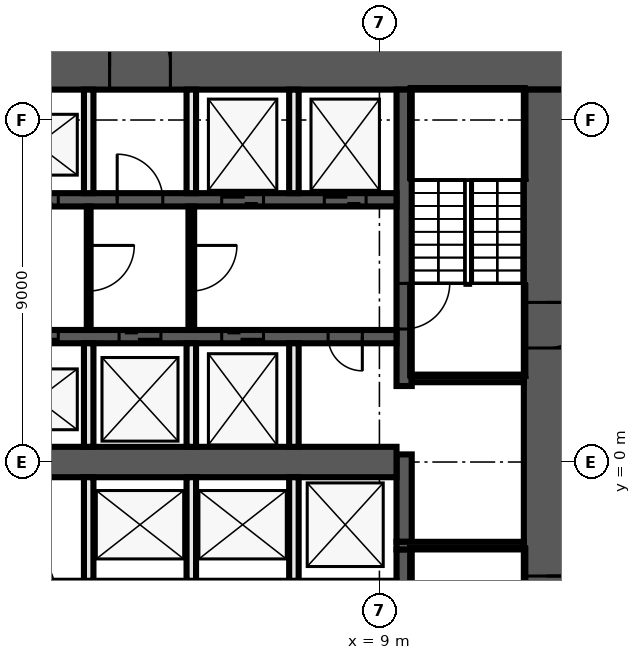
"""IFC4 building model, lengths in metres.
Left out: names, types, materials, properties, quantities, classifications, styles, units other than length and angle.
Written with IfcOpenShell. Run it as: python <this file> out.ifc"""

import sys

from ifc_helpers import new_model, si_unit, direction, frame, frame_2d, origin, place, context, subcontext, project, spatial, rectangle, extrude, element, fill, save


model = new_model("IFC4")
c1 = context("Model", 3, precision=1e-05, world=origin(), true_north=direction((0.0, 1.0)))
c2 = subcontext(c1, "Body", "Model", "MODEL_VIEW")
j1 = project(units=[si_unit("LENGTHUNIT", "METRE"), si_unit("PLANEANGLEUNIT", "RADIAN")], contexts=[c1])
p1 = place(None, origin())
s1 = spatial("IfcSite", under=j1, at=p1, CompositionType="ELEMENT")
p2 = place(p1, origin())
s2 = spatial("IfcBuilding", under=s1, at=p2, CompositionType="ELEMENT")
p3 = place(p2, origin())
s3 = spatial("IfcBuildingStorey", under=s2, at=p3, CompositionType="ELEMENT", Elevation=0.0)
p4 = place(p3, frame((-14.0, 10.4, 0.0), z_axis=(0.0, 0.0, 1.0), x_axis=(1.0, 0.0, 0.0)))
e1 = element("IfcWall", 1, at=p4, inside=s3, PredefinedType="SHEAR", context=c2, shape_type="SweptSolid", body=[
    extrude(rectangle(XDim=28.0, YDim=1.2, at=frame_2d((14.0, 0.0))), origin(), (0.0, 0.0, 1.0), 8.55),
])
p5 = place(p4, frame((15.9, 0.0, 0.0)))
e2 = element("IfcOpeningElement", 2, at=p5, cuts=e1, PredefinedType="OPENING", context=c2, shape_type="SweptSolid", body=[
    extrude(rectangle(XDim=1.6, YDim=2.1, at=frame_2d((0.8, 1.05))), frame((0.0, 0.61, 0.0), z_axis=(0.0, -1.0, 0.0), x_axis=(1.0, 0.0, 0.0)), (0.0, 0.0, 1.0), 1.22),
])
p6 = place(p3, frame((13.4, 9.8, 0.0), z_axis=(0.0, 0.0, 1.0), x_axis=(0.0, -1.0, 0.0)))
e3 = element("IfcWall", 3, at=p6, inside=s3, PredefinedType="SHEAR", context=c2, shape_type="SweptSolid", body=[
    extrude(rectangle(XDim=19.6, YDim=1.2, at=frame_2d((9.8, 0.0))), origin(), (0.0, 0.0, 1.0), 8.55),
])
p7 = place(p6, frame((5.6, 0.0, 0.0)))
e4 = element("IfcOpeningElement", 4, at=p7, cuts=e3, PredefinedType="OPENING", context=c2, shape_type="SweptSolid", body=[
    extrude(rectangle(XDim=1.2, YDim=2.1, at=frame_2d((0.6, 1.05))), frame((0.0, 0.61, 0.0), z_axis=(0.0, -1.0, 0.0), x_axis=(1.0, 0.0, 0.0)), (0.0, 0.0, 1.0), 1.22),
])
p8 = place(p6, frame((12.8, 0.0, 0.0)))
e5 = element("IfcOpeningElement", 5, at=p8, cuts=e3, PredefinedType="OPENING", context=c2, shape_type="SweptSolid", body=[
    extrude(rectangle(XDim=1.2, YDim=2.1, at=frame_2d((0.6, 1.05))), frame((0.0, 0.61, 0.0), z_axis=(0.0, -1.0, 0.0), x_axis=(1.0, 0.0, 0.0)), (0.0, 0.0, 1.0), 1.22),
])
p9 = place(p3, frame((9.65, -2.3, 0.0), z_axis=(0.0, 0.0, 1.0), x_axis=(0.0, -1.0, 0.0)))
e6 = element("IfcWall", 6, at=p9, inside=s3, PredefinedType="SHEAR", context=c2, shape_type="SweptSolid", body=[
    extrude(rectangle(XDim=7.5, YDim=0.4, at=frame_2d((3.75, 0.0))), origin(), (0.0, 0.0, 1.0), 8.55),
])
p10 = place(p9, frame((1.2, 0.0, 0.0)))
e7 = element("IfcOpeningElement", 7, at=p10, cuts=e6, PredefinedType="OPENING", context=c2, shape_type="SweptSolid", body=[
    extrude(rectangle(XDim=1.2, YDim=2.1, at=frame_2d((0.6, 1.05))), frame((0.0, 0.21, 0.0), z_axis=(0.0, -1.0, 0.0), x_axis=(1.0, 0.0, 0.0)), (0.0, 0.0, 1.0), 0.42),
])
p11 = place(p3, frame((9.65, -2.1, 0.0), z_axis=(0.0, 0.0, 1.0), x_axis=(0.0, 1.0, 0.0)))
e8 = element("IfcWall", 8, at=p11, inside=s3, PredefinedType="SHEAR", context=c2, shape_type="SweptSolid", body=[
    extrude(rectangle(XDim=2.3, YDim=0.4, at=frame_2d((1.15, 0.0))), origin(), (0.0, 0.0, 1.0), 8.55),
])
p12 = place(p3, frame((9.65, 9.8, 0.0), z_axis=(0.0, 0.0, 1.0), x_axis=(0.0, -1.0, 0.0)))
e9 = element("IfcWall", 9, at=p12, inside=s3, PredefinedType="SHEAR", context=c2, shape_type="SweptSolid", body=[
    extrude(rectangle(XDim=7.8, YDim=0.4, at=frame_2d((3.9, 0.0))), origin(), (0.0, 0.0, 1.0), 8.55),
])
p13 = place(p12, frame((5.1, 0.0, 0.0)))
e10 = element("IfcOpeningElement", 10, at=p13, cuts=e9, PredefinedType="OPENING", context=c2, shape_type="SweptSolid", body=[
    extrude(rectangle(XDim=1.2, YDim=2.1, at=frame_2d((0.6, 1.05))), frame((0.0, 0.21, 0.0), z_axis=(0.0, -1.0, 0.0), x_axis=(1.0, 0.0, 0.0)), (0.0, 0.0, 1.0), 0.42),
])
p14 = place(p3, frame((9.85, 2.2, 0.0), z_axis=(0.0, 0.0, 1.0), x_axis=(1.0, 0.0, 0.0)))
e11 = element("IfcWall", 11, at=p14, inside=s3, PredefinedType="SHEAR", context=c2, shape_type="SweptSolid", body=[
    extrude(rectangle(XDim=2.95, YDim=0.2, at=frame_2d((1.475, 0.0))), origin(), (0.0, 0.0, 1.0), 8.55),
])
p15 = place(p3, frame((9.45, -2.2, 0.0), z_axis=(0.0, 0.0, 1.0), x_axis=(1.0, 0.0, 0.0)))
e12 = element("IfcWall", 12, at=p15, inside=s3, PredefinedType="SHEAR", context=c2, shape_type="SweptSolid", body=[
    extrude(rectangle(XDim=3.35, YDim=0.2, at=frame_2d((1.675, 0.0))), origin(), (0.0, 0.0, 1.0), 8.55),
])
p16 = place(p3, frame((-9.45, 6.9, 0.0), z_axis=(0.0, 0.0, 1.0), x_axis=(1.0, 0.0, 0.0)))
e13 = element("IfcWall", 13, at=p16, inside=s3, PredefinedType="SHEAR", context=c2, shape_type="SweptSolid", body=[
    extrude(rectangle(XDim=18.9, YDim=0.35, at=frame_2d((9.45, 0.0))), origin(), (0.0, 0.0, 1.0), 8.55),
])
p17 = place(p16, frame((0.8, 0.0, 0.0)))
e14 = element("IfcOpeningElement", 14, at=p17, cuts=e13, PredefinedType="OPENING", context=c2, shape_type="SweptSolid", body=[
    extrude(rectangle(XDim=1.1, YDim=2.1, at=frame_2d((0.55, 1.05))), frame((0.0, 0.185, 0.0), z_axis=(0.0, -1.0, 0.0), x_axis=(1.0, 0.0, 0.0)), (0.0, 0.0, 1.0), 0.37),
])
p18 = place(p16, frame((3.5, 0.0, 0.0)))
e15 = element("IfcOpeningElement", 15, at=p18, cuts=e13, PredefinedType="OPENING", context=c2, shape_type="SweptSolid", body=[
    extrude(rectangle(XDim=1.1, YDim=2.1, at=frame_2d((0.55, 1.05))), frame((0.0, 0.185, 0.0), z_axis=(0.0, -1.0, 0.0), x_axis=(1.0, 0.0, 0.0)), (0.0, 0.0, 1.0), 0.37),
])
p19 = place(p16, frame((6.2, 0.0, 0.0)))
e16 = element("IfcOpeningElement", 16, at=p19, cuts=e13, PredefinedType="OPENING", context=c2, shape_type="SweptSolid", body=[
    extrude(rectangle(XDim=1.1, YDim=2.1, at=frame_2d((0.55, 1.05))), frame((0.0, 0.185, 0.0), z_axis=(0.0, -1.0, 0.0), x_axis=(1.0, 0.0, 0.0)), (0.0, 0.0, 1.0), 0.37),
])
p20 = place(p16, frame((8.9, 0.0, 0.0)))
e17 = element("IfcOpeningElement", 17, at=p20, cuts=e13, PredefinedType="OPENING", context=c2, shape_type="SweptSolid", body=[
    extrude(rectangle(XDim=1.1, YDim=2.1, at=frame_2d((0.55, 1.05))), frame((0.0, 0.185, 0.0), z_axis=(0.0, -1.0, 0.0), x_axis=(1.0, 0.0, 0.0)), (0.0, 0.0, 1.0), 0.37),
])
p21 = place(p16, frame((11.55, 0.0, 0.0)))
e18 = element("IfcOpeningElement", 18, at=p21, cuts=e13, PredefinedType="OPENING", context=c2, shape_type="SweptSolid", body=[
    extrude(rectangle(XDim=1.2, YDim=2.1, at=frame_2d((0.6, 1.05))), frame((0.0, 0.185, 0.0), z_axis=(0.0, -1.0, 0.0), x_axis=(1.0, 0.0, 0.0)), (0.0, 0.0, 1.0), 0.37),
])
p22 = place(p16, frame((14.3, 0.0, 0.0)))
e19 = element("IfcOpeningElement", 19, at=p22, cuts=e13, PredefinedType="OPENING", context=c2, shape_type="SweptSolid", body=[
    extrude(rectangle(XDim=1.1, YDim=2.1, at=frame_2d((0.55, 1.05))), frame((0.0, 0.185, 0.0), z_axis=(0.0, -1.0, 0.0), x_axis=(1.0, 0.0, 0.0)), (0.0, 0.0, 1.0), 0.37),
])
p23 = place(p16, frame((17.0, 0.0, 0.0)))
e20 = element("IfcOpeningElement", 20, at=p23, cuts=e13, PredefinedType="OPENING", context=c2, shape_type="SweptSolid", body=[
    extrude(rectangle(XDim=1.1, YDim=2.1, at=frame_2d((0.55, 1.05))), frame((0.0, 0.185, 0.0), z_axis=(0.0, -1.0, 0.0), x_axis=(1.0, 0.0, 0.0)), (0.0, 0.0, 1.0), 0.37),
])
p24 = place(p3, frame((9.45, 3.3, 0.0), z_axis=(0.0, 0.0, 1.0), x_axis=(-1.0, 0.0, 0.0)))
e21 = element("IfcWall", 21, at=p24, inside=s3, PredefinedType="SHEAR", context=c2, shape_type="SweptSolid", body=[
    extrude(rectangle(XDim=18.9, YDim=0.35, at=frame_2d((9.45, 0.0))), origin(), (0.0, 0.0, 1.0), 8.55),
])
p25 = place(p24, frame((0.9, 0.0, 0.0)))
e22 = element("IfcOpeningElement", 22, at=p25, cuts=e21, PredefinedType="OPENING", context=c2, shape_type="SweptSolid", body=[
    extrude(rectangle(XDim=0.9, YDim=2.1, at=frame_2d((0.45, 1.05))), frame((0.0, 0.185, 0.0), z_axis=(0.0, -1.0, 0.0), x_axis=(1.0, 0.0, 0.0)), (0.0, 0.0, 1.0), 0.37),
])
p26 = place(p24, frame((17.0, 0.0, 0.0)))
e23 = element("IfcOpeningElement", 23, at=p26, cuts=e21, PredefinedType="OPENING", context=c2, shape_type="SweptSolid", body=[
    extrude(rectangle(XDim=1.1, YDim=2.1, at=frame_2d((0.55, 1.05))), frame((0.0, 0.185, 0.0), z_axis=(0.0, -1.0, 0.0), x_axis=(1.0, 0.0, 0.0)), (0.0, 0.0, 1.0), 0.37),
])
p27 = place(p24, frame((14.3, 0.0, 0.0)))
e24 = element("IfcOpeningElement", 24, at=p27, cuts=e21, PredefinedType="OPENING", context=c2, shape_type="SweptSolid", body=[
    extrude(rectangle(XDim=1.1, YDim=2.1, at=frame_2d((0.55, 1.05))), frame((0.0, 0.185, 0.0), z_axis=(0.0, -1.0, 0.0), x_axis=(1.0, 0.0, 0.0)), (0.0, 0.0, 1.0), 0.37),
])
p28 = place(p24, frame((11.6, 0.0, 0.0)))
e25 = element("IfcOpeningElement", 25, at=p28, cuts=e21, PredefinedType="OPENING", context=c2, shape_type="SweptSolid", body=[
    extrude(rectangle(XDim=1.1, YDim=2.1, at=frame_2d((0.55, 1.05))), frame((0.0, 0.185, 0.0), z_axis=(0.0, -1.0, 0.0), x_axis=(1.0, 0.0, 0.0)), (0.0, 0.0, 1.0), 0.37),
])
p29 = place(p24, frame((8.9, 0.0, 0.0)))
e26 = element("IfcOpeningElement", 26, at=p29, cuts=e21, PredefinedType="OPENING", context=c2, shape_type="SweptSolid", body=[
    extrude(rectangle(XDim=1.1, YDim=2.1, at=frame_2d((0.55, 1.05))), frame((0.0, 0.185, 0.0), z_axis=(0.0, -1.0, 0.0), x_axis=(1.0, 0.0, 0.0)), (0.0, 0.0, 1.0), 0.37),
])
p30 = place(p24, frame((6.2, 0.0, 0.0)))
e27 = element("IfcOpeningElement", 27, at=p30, cuts=e21, PredefinedType="OPENING", context=c2, shape_type="SweptSolid", body=[
    extrude(rectangle(XDim=1.1, YDim=2.1, at=frame_2d((0.55, 1.05))), frame((0.0, 0.185, 0.0), z_axis=(0.0, -1.0, 0.0), x_axis=(1.0, 0.0, 0.0)), (0.0, 0.0, 1.0), 0.37),
])
p31 = place(p24, frame((3.5, 0.0, 0.0)))
e28 = element("IfcOpeningElement", 28, at=p31, cuts=e21, PredefinedType="OPENING", context=c2, shape_type="SweptSolid", body=[
    extrude(rectangle(XDim=1.1, YDim=2.1, at=frame_2d((0.55, 1.05))), frame((0.0, 0.185, 0.0), z_axis=(0.0, -1.0, 0.0), x_axis=(1.0, 0.0, 0.0)), (0.0, 0.0, 1.0), 0.37),
])
p32 = place(p3, frame((-9.45, 0.0, 0.0), z_axis=(0.0, 0.0, 1.0), x_axis=(1.0, 0.0, 0.0)))
e29 = element("IfcWall", 29, at=p32, inside=s3, PredefinedType="SHEAR", context=c2, shape_type="SweptSolid", body=[
    extrude(rectangle(XDim=18.9, YDim=0.8, at=frame_2d((9.45, 0.0))), origin(), (0.0, 0.0, 1.0), 8.55),
])
for number, where, z_axis, x_axis in (
    (30, (6.75, -3.125, 0.0), (0.0, 0.0, 1.0), (0.0, 1.0, 0.0)),
    (31, (6.75, 0.4, 0.0), (0.0, 0.0, 1.0), (0.0, 1.0, 0.0)),
    (32, (6.75, 7.075, 0.0), (0.0, 0.0, 1.0), (0.0, 1.0, 0.0)),
):
    element("IfcWall", number, at=place(p3, frame(where, z_axis=z_axis, x_axis=x_axis)), inside=s3, PredefinedType="SOLIDWALL", context=c2, shape_type="SweptSolid", body=[
        extrude(rectangle(XDim=2.725, YDim=0.25, at=frame_2d((1.363, 0.0))), origin(), (0.0, 0.0, 1.0), 8.55),
    ])
p33 = place(p3, frame((4.05, 6.725, 0.0), z_axis=(0.0, 0.0, 1.0), x_axis=(0.0, -1.0, 0.0)))
e33 = element("IfcWall", 33, at=p33, inside=s3, PredefinedType="PARTITIONING", context=c2, shape_type="SweptSolid", body=[
    extrude(rectangle(XDim=3.25, YDim=0.15, at=frame_2d((1.625, 0.0))), origin(), (0.0, 0.0, 1.0), 8.55),
])
p34 = place(p33, frame((1.025, 0.0, 0.0)))
e34 = element("IfcOpeningElement", 34, at=p34, cuts=e33, PredefinedType="OPENING", context=c2, shape_type="SweptSolid", body=[
    extrude(rectangle(XDim=1.2, YDim=2.1, at=frame_2d((0.6, 1.05))), frame((0.0, 0.085, 0.0), z_axis=(0.0, -1.0, 0.0), x_axis=(1.0, 0.0, 0.0)), (0.0, 0.0, 1.0), 0.17),
])
for number, where, z_axis, x_axis in (
    (35, (4.05, -3.125, 0.0), (0.0, 0.0, 1.0), (0.0, 1.0, 0.0)),
    (36, (4.05, 0.4, 0.0), (0.0, 0.0, 1.0), (0.0, 1.0, 0.0)),
    (37, (4.05, 7.075, 0.0), (0.0, 0.0, 1.0), (0.0, 1.0, 0.0)),
):
    element("IfcWall", number, at=place(p3, frame(where, z_axis=z_axis, x_axis=x_axis)), inside=s3, PredefinedType="SOLIDWALL", context=c2, shape_type="SweptSolid", body=[
        extrude(rectangle(XDim=2.725, YDim=0.25, at=frame_2d((1.363, 0.0))), origin(), (0.0, 0.0, 1.0), 8.55),
    ])
p35 = place(p3, frame((1.35, 6.725, 0.0), z_axis=(0.0, 0.0, 1.0), x_axis=(0.0, -1.0, 0.0)))
e38 = element("IfcWall", 38, at=p35, inside=s3, PredefinedType="PARTITIONING", context=c2, shape_type="SweptSolid", body=[
    extrude(rectangle(XDim=3.25, YDim=0.1, at=frame_2d((1.625, 0.0))), origin(), (0.0, 0.0, 1.0), 8.55),
])
p36 = place(p35, frame((1.025, 0.0, 0.0)))
e39 = element("IfcOpeningElement", 39, at=p36, cuts=e38, PredefinedType="OPENING", context=c2, shape_type="SweptSolid", body=[
    extrude(rectangle(XDim=1.2, YDim=2.1, at=frame_2d((0.6, 1.05))), frame((0.0, 0.06, 0.0), z_axis=(0.0, -1.0, 0.0), x_axis=(1.0, 0.0, 0.0)), (0.0, 0.0, 1.0), 0.12),
])
for number, where, z_axis, x_axis in (
    (40, (1.35, -3.125, 0.0), (0.0, 0.0, 1.0), (0.0, 1.0, 0.0)),
    (41, (1.35, 0.4, 0.0), (0.0, 0.0, 1.0), (0.0, 1.0, 0.0)),
    (42, (1.35, 7.075, 0.0), (0.0, 0.0, 1.0), (0.0, 1.0, 0.0)),
):
    element("IfcWall", number, at=place(p3, frame(where, z_axis=z_axis, x_axis=x_axis)), inside=s3, PredefinedType="SOLIDWALL", context=c2, shape_type="SweptSolid", body=[
        extrude(rectangle(XDim=2.725, YDim=0.25, at=frame_2d((1.363, 0.0))), origin(), (0.0, 0.0, 1.0), 8.55),
    ])
p37 = place(p25, origin())
e43 = element("IfcDoor", 43, at=p37, inside=s3, OperationType="SINGLE_SWING_LEFT", PredefinedType="DOOR", context=c2, shape_type="SweptSolid", body=[
    extrude(rectangle(XDim=0.9, YDim=2.1, at=frame_2d((0.45, 1.05))), frame((0.0, 0.025, 0.0), z_axis=(0.0, -1.0, 0.0), x_axis=(1.0, 0.0, 0.0)), (0.0, 0.0, 1.0), 0.05),
])
fill(e22, e43)
p38 = place(p20, origin())
e44 = element("IfcDoor", 44, at=p38, inside=s3, OperationType="DOUBLE_DOOR_SLIDING", PredefinedType="DOOR", context=c2, shape_type="SweptSolid", body=[
    extrude(rectangle(XDim=1.1, YDim=2.1, at=frame_2d((0.55, 1.05))), frame((0.0, 0.025, 0.0), z_axis=(0.0, -1.0, 0.0), x_axis=(1.0, 0.0, 0.0)), (0.0, 0.0, 1.0), 0.05),
])
fill(e17, e44)
p39 = place(p5, origin())
e45 = element("IfcDoor", 45, at=p39, inside=s3, OperationType="DOUBLE_DOOR_SINGLE_SWING", PredefinedType="DOOR", context=c2, shape_type="SweptSolid", body=[
    extrude(rectangle(XDim=1.6, YDim=2.1, at=frame_2d((0.8, 1.05))), frame((0.0, 0.025, 0.0), z_axis=(0.0, -1.0, 0.0), x_axis=(1.0, 0.0, 0.0)), (0.0, 0.0, 1.0), 0.05),
])
fill(e2, e45)
p40 = place(p21, origin())
e46 = element("IfcDoor", 46, at=p40, inside=s3, OperationType="SINGLE_SWING_LEFT", PredefinedType="DOOR", context=c2, shape_type="SweptSolid", body=[
    extrude(rectangle(XDim=1.2, YDim=2.1, at=frame_2d((0.6, 1.05))), frame((0.0, 0.025, 0.0), z_axis=(0.0, -1.0, 0.0), x_axis=(1.0, 0.0, 0.0)), (0.0, 0.0, 1.0), 0.05),
])
fill(e18, e46)
p41 = place(p22, origin())
e47 = element("IfcDoor", 47, at=p41, inside=s3, OperationType="DOUBLE_DOOR_SLIDING", PredefinedType="DOOR", context=c2, shape_type="SweptSolid", body=[
    extrude(rectangle(XDim=1.1, YDim=2.1, at=frame_2d((0.55, 1.05))), frame((0.0, 0.025, 0.0), z_axis=(0.0, -1.0, 0.0), x_axis=(1.0, 0.0, 0.0)), (0.0, 0.0, 1.0), 0.05),
])
fill(e19, e47)
p42 = place(p23, origin())
e48 = element("IfcDoor", 48, at=p42, inside=s3, OperationType="DOUBLE_DOOR_SLIDING", PredefinedType="DOOR", context=c2, shape_type="SweptSolid", body=[
    extrude(rectangle(XDim=1.1, YDim=2.1, at=frame_2d((0.55, 1.05))), frame((0.0, 0.025, 0.0), z_axis=(0.0, -1.0, 0.0), x_axis=(1.0, 0.0, 0.0)), (0.0, 0.0, 1.0), 0.05),
])
fill(e20, e48)
p43 = place(p29, origin())
e49 = element("IfcDoor", 49, at=p43, inside=s3, OperationType="DOUBLE_DOOR_SLIDING", PredefinedType="DOOR", context=c2, shape_type="SweptSolid", body=[
    extrude(rectangle(XDim=1.1, YDim=2.1, at=frame_2d((0.55, 1.05))), frame((0.0, 0.025, 0.0), z_axis=(0.0, -1.0, 0.0), x_axis=(1.0, 0.0, 0.0)), (0.0, 0.0, 1.0), 0.05),
])
fill(e26, e49)
p44 = place(p30, origin())
e50 = element("IfcDoor", 50, at=p44, inside=s3, OperationType="DOUBLE_DOOR_SLIDING", PredefinedType="DOOR", context=c2, shape_type="SweptSolid", body=[
    extrude(rectangle(XDim=1.1, YDim=2.1, at=frame_2d((0.55, 1.05))), frame((0.0, 0.025, 0.0), z_axis=(0.0, -1.0, 0.0), x_axis=(1.0, 0.0, 0.0)), (0.0, 0.0, 1.0), 0.05),
])
fill(e27, e50)
p45 = place(p31, origin())
e51 = element("IfcDoor", 51, at=p45, inside=s3, OperationType="DOUBLE_DOOR_SLIDING", PredefinedType="DOOR", context=c2, shape_type="SweptSolid", body=[
    extrude(rectangle(XDim=1.1, YDim=2.1, at=frame_2d((0.55, 1.05))), frame((0.0, 0.025, 0.0), z_axis=(0.0, -1.0, 0.0), x_axis=(1.0, 0.0, 0.0)), (0.0, 0.0, 1.0), 0.05),
])
fill(e28, e51)
p46 = place(p13, origin())
e52 = element("IfcDoor", 52, at=p46, inside=s3, OperationType="SINGLE_SWING_LEFT", PredefinedType="DOOR", context=c2, shape_type="SweptSolid", body=[
    extrude(rectangle(XDim=1.2, YDim=2.1, at=frame_2d((0.6, 1.05))), frame((0.0, 0.025, 0.0), z_axis=(0.0, -1.0, 0.0), x_axis=(1.0, 0.0, 0.0)), (0.0, 0.0, 1.0), 0.05),
])
fill(e10, e52)
p47 = place(p36, origin())
e53 = element("IfcDoor", 53, at=p47, inside=s3, OperationType="SINGLE_SWING_LEFT", PredefinedType="DOOR", context=c2, shape_type="SweptSolid", body=[
    extrude(rectangle(XDim=1.2, YDim=2.1, at=frame_2d((0.6, 1.05))), frame((0.0, 0.025, 0.0), z_axis=(0.0, -1.0, 0.0), x_axis=(1.0, 0.0, 0.0)), (0.0, 0.0, 1.0), 0.05),
])
fill(e39, e53)
p48 = place(p34, origin())
e54 = element("IfcDoor", 54, at=p48, inside=s3, OperationType="SINGLE_SWING_RIGHT", PredefinedType="DOOR", context=c2, shape_type="SweptSolid", body=[
    extrude(rectangle(XDim=1.2, YDim=2.1, at=frame_2d((0.6, 1.05))), frame((0.0, 0.025, 0.0), z_axis=(0.0, -1.0, 0.0), x_axis=(1.0, 0.0, 0.0)), (0.0, 0.0, 1.0), 0.05),
])
fill(e34, e54)
p49 = place(p7, origin())
e55 = element("IfcDoor", 55, at=p49, inside=s3, OperationType="SINGLE_SWING_LEFT", PredefinedType="DOOR", context=c2, shape_type="SweptSolid", body=[
    extrude(rectangle(XDim=1.2, YDim=2.1, at=frame_2d((0.6, 1.05))), frame((0.0, 0.025, 0.0), z_axis=(0.0, -1.0, 0.0), x_axis=(1.0, 0.0, 0.0)), (0.0, 0.0, 1.0), 0.05),
])
fill(e4, e55)
p50 = place(p8, origin())
e56 = element("IfcDoor", 56, at=p50, inside=s3, OperationType="SINGLE_SWING_LEFT", PredefinedType="DOOR", context=c2, shape_type="SweptSolid", body=[
    extrude(rectangle(XDim=1.2, YDim=2.1, at=frame_2d((0.6, 1.05))), frame((0.0, 0.025, 0.0), z_axis=(0.0, -1.0, 0.0), x_axis=(1.0, 0.0, 0.0)), (0.0, 0.0, 1.0), 0.05),
])
fill(e5, e56)
save(model, sys.argv[1])
